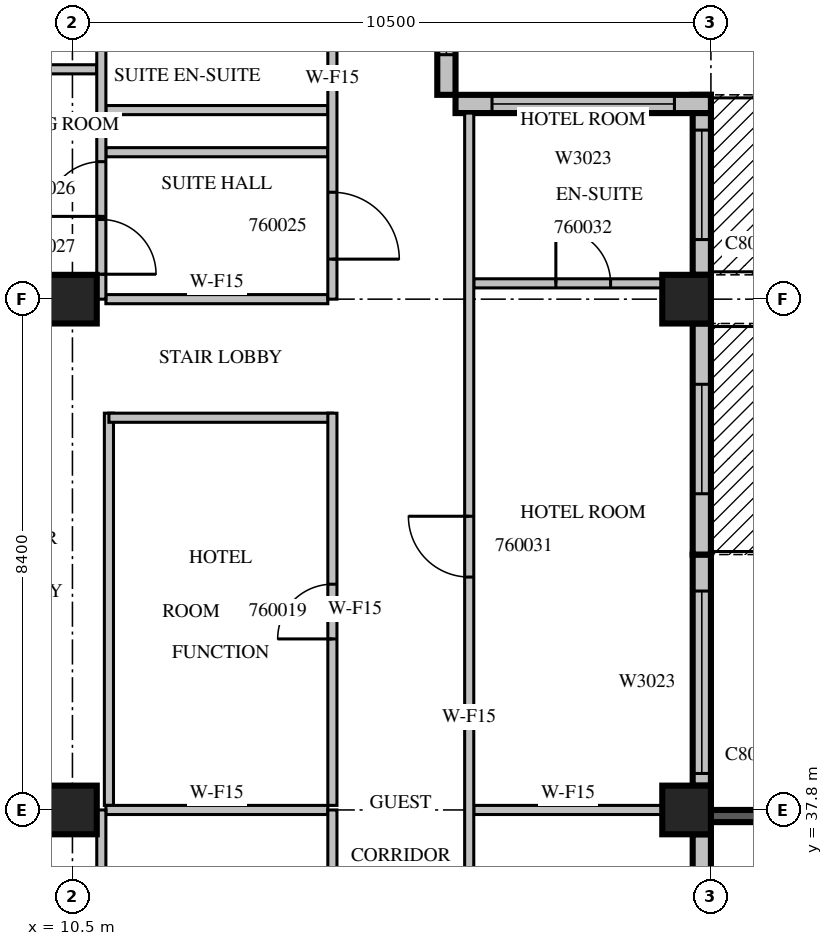
"""IFC4 building model, lengths in metres.
Left out: names, types, materials, properties, quantities, classifications, styles, units other than length and angle.
Written with IfcOpenShell. Run it as: python <this file> out.ifc"""

import sys

from ifc_helpers import new_model, si_unit, direction, frame, frame_2d, origin, origin_2d, place, context, subcontext, project, spatial, rectangle, extrude, source, transform, mapped, element, fill, save


model = new_model("IFC4")
c1 = context("Model", 3, precision=1e-05, world=origin(), true_north=direction((0.0, 1.0)))
c2 = subcontext(c1, "Body", "Model", "MODEL_VIEW")
j1 = project(units=[si_unit("LENGTHUNIT", "METRE"), si_unit("PLANEANGLEUNIT", "RADIAN")], contexts=[c1])
p1 = place(None, origin())
s1 = spatial("IfcSite", under=j1, at=p1, CompositionType="ELEMENT")
p2 = place(p1, origin())
s2 = spatial("IfcBuilding", under=s1, at=p2, CompositionType="ELEMENT")
p3 = place(p2, frame((0.0, 0.0, 261.4)))
s3 = spatial("IfcBuildingStorey", under=s2, at=p3, CompositionType="ELEMENT", Elevation=261.4)
m1 = source(origin(), c2, "Body", "SweptSolid", [
    extrude(rectangle(XDim=0.8, YDim=0.8, at=origin_2d()), origin(), (0.0, 0.0, 1.0), 3.8),
])
for number, where, z_axis, x_axis in (
    (1, (10.5, 37.8, 0.0), (0.0, 0.0, 1.0), (1.0, 0.0, 0.0)),
    (2, (20.6, 37.8, 0.0), (0.0, 0.0, 1.0), (1.0, 0.0, 0.0)),
    (3, (10.5, 46.2, 0.0), (0.0, 0.0, 1.0), (1.0, 0.0, 0.0)),
    (4, (20.6, 46.2, 0.0), (0.0, 0.0, 1.0), (1.0, 0.0, 0.0)),
):
    element("IfcColumn", number, at=place(p3, frame(where, z_axis=z_axis, x_axis=x_axis)), inside=s3, PredefinedType="COLUMN", context=c2, shape_type="MappedRepresentation", body=[
        mapped(m1, transform((0.0, 0.0, 0.0), scale=1.0)),
    ])
m2 = source(origin(), c2, "Body", "SweptSolid", [
    extrude(rectangle(XDim=3.9, YDim=0.2, at=frame_2d((1.95, 0.0))), origin(), (0.0, 0.0, 1.0), 3.4),
])
p4 = place(p3, frame((21.0, 37.7, 0.0), z_axis=(0.0, 0.0, 1.0), x_axis=(1.0, 0.0, 0.0)))
e5 = element("IfcWall", 5, at=p4, inside=s3, PredefinedType="SOLIDWALL", context=c2, shape_type="MappedRepresentation", body=[
    mapped(m2, transform((0.0, 0.0, 0.0), scale=1.0)),
])
m3 = source(origin(), c2, "Body", "SweptSolid", [
    extrude(rectangle(XDim=2.4, YDim=2.3, at=frame_2d((1.2, 1.15))), frame((0.0, 0.11, 0.0), z_axis=(0.0, -1.0, 0.0), x_axis=(1.0, 0.0, 0.0)), (0.0, 0.0, 1.0), 0.22),
])
p5 = place(p4, frame((0.75, 0.0, 0.6)))
e6 = element("IfcOpeningElement", 6, at=p5, cuts=e5, PredefinedType="OPENING", context=c2, shape_type="MappedRepresentation", body=[
    mapped(m3, transform((0.0, 0.0, 0.0), scale=1.0)),
])
m4 = source(origin(), c2, "Body", "SweptSolid", [
    extrude(rectangle(XDim=7.6, YDim=0.3, at=frame_2d((3.8, 0.0))), origin(), (0.0, 0.0, 1.0), 3.4),
])
p6 = place(p3, frame((20.85, 29.8, 0.0), z_axis=(0.0, 0.0, 1.0), x_axis=(0.0, 1.0, 0.0)))
e7 = element("IfcWall", 7, at=p6, inside=s3, PredefinedType="STANDARD", context=c2, shape_type="MappedRepresentation", body=[
    mapped(m4, transform((0.0, 0.0, 0.0), scale=1.0)),
])
m5 = source(origin(), c2, "Body", "SweptSolid", [
    extrude(rectangle(XDim=3.0, YDim=2.3, at=frame_2d((1.5, 1.15))), frame((0.0, 0.16, 0.0), z_axis=(0.0, -1.0, 0.0), x_axis=(1.0, 0.0, 0.0)), (0.0, 0.0, 1.0), 0.32),
])
p7 = place(p6, frame((0.2, 0.0, 0.6)))
e8 = element("IfcOpeningElement", 8, at=p7, cuts=e7, PredefinedType="OPENING", context=c2, shape_type="MappedRepresentation", body=[
    mapped(m5, transform((0.0, 0.0, 0.0), scale=1.0)),
])
m6 = source(origin(), c2, "Body", "SweptSolid", [
    extrude(rectangle(XDim=1.0, YDim=2.1, at=frame_2d((0.5, 1.05))), frame((0.0, 0.16, 0.0), z_axis=(0.0, -1.0, 0.0), x_axis=(1.0, 0.0, 0.0)), (0.0, 0.0, 1.0), 0.32),
])
p8 = place(p6, frame((5.4, 0.0, 0.0)))
e9 = element("IfcOpeningElement", 9, at=p8, cuts=e7, PredefinedType="OPENING", context=c2, shape_type="MappedRepresentation", body=[
    mapped(m6, transform((0.0, 0.0, 0.0), scale=1.0)),
])
m7 = source(origin(), c2, "Body", "SweptSolid", [
    extrude(rectangle(XDim=3.8, YDim=0.3, at=frame_2d((1.9, 0.0))), origin(), (0.0, 0.0, 1.0), 3.4),
])
p9 = place(p3, frame((20.85, 38.2, 0.0), z_axis=(0.0, 0.0, 1.0), x_axis=(0.0, 1.0, 0.0)))
e10 = element("IfcWall", 10, at=p9, inside=s3, PredefinedType="STANDARD", context=c2, shape_type="MappedRepresentation", body=[
    mapped(m7, transform((0.0, 0.0, 0.0), scale=1.0)),
])
p10 = place(p9, frame((0.2, 0.0, 0.6)))
e11 = element("IfcOpeningElement", 11, at=p10, cuts=e10, PredefinedType="OPENING", context=c2, shape_type="MappedRepresentation", body=[
    mapped(m5, transform((0.0, 0.0, 0.0), scale=1.0)),
])
p11 = place(p3, frame((20.85, 42.0, 0.0), z_axis=(0.0, 0.0, 1.0), x_axis=(0.0, 1.0, 0.0)))
e12 = element("IfcWall", 12, at=p11, inside=s3, PredefinedType="STANDARD", context=c2, shape_type="MappedRepresentation", body=[
    mapped(m7, transform((0.0, 0.0, 0.0), scale=1.0)),
])
m8 = source(origin(), c2, "Body", "SweptSolid", [
    extrude(rectangle(XDim=1.8, YDim=2.4, at=frame_2d((0.9, 1.2))), frame((0.0, 0.16, 0.0), z_axis=(0.0, -1.0, 0.0), x_axis=(1.0, 0.0, 0.0)), (0.0, 0.0, 1.0), 0.32),
])
p12 = place(p11, frame((1.0, 0.0, 0.0)))
e13 = element("IfcOpeningElement", 13, at=p12, cuts=e12, PredefinedType="OPENING", context=c2, shape_type="MappedRepresentation", body=[
    mapped(m8, transform((0.0, 0.0, 0.0), scale=1.0)),
])
m9 = source(origin(), c2, "Body", "SweptSolid", [
    extrude(rectangle(XDim=2.96, YDim=0.3, at=frame_2d((1.48, 0.0))), origin(), (0.0, 0.0, 1.0), 3.4),
])
p13 = place(p3, frame((20.85, 46.6, 0.0), z_axis=(0.0, 0.0, 1.0), x_axis=(0.0, 1.0, 0.0)))
e14 = element("IfcWall", 14, at=p13, inside=s3, PredefinedType="STANDARD", context=c2, shape_type="MappedRepresentation", body=[
    mapped(m9, transform((0.0, 0.0, 0.0), scale=1.0)),
])
p14 = place(p13, frame((0.58, 0.0, 0.0)))
e15 = element("IfcOpeningElement", 15, at=p14, cuts=e14, PredefinedType="OPENING", context=c2, shape_type="MappedRepresentation", body=[
    mapped(m8, transform((0.0, 0.0, 0.0), scale=1.0)),
])
m10 = source(origin(), c2, "Body", "SweptSolid", [
    extrude(rectangle(XDim=4.2, YDim=0.3, at=frame_2d((2.1, 0.0))), origin(), (0.0, 0.0, 1.0), 3.4),
])
p15 = place(p3, frame((21.0, 49.41, 0.0), z_axis=(0.0, 0.0, 1.0), x_axis=(-1.0, 0.0, 0.0)))
e16 = element("IfcWall", 16, at=p15, inside=s3, PredefinedType="STANDARD", context=c2, shape_type="MappedRepresentation", body=[
    mapped(m10, transform((0.0, 0.0, 0.0), scale=1.0)),
])
p16 = place(p15, frame((0.6, 0.0, 0.6)))
e17 = element("IfcOpeningElement", 17, at=p16, cuts=e16, PredefinedType="OPENING", context=c2, shape_type="MappedRepresentation", body=[
    mapped(m5, transform((0.0, 0.0, 0.0), scale=1.0)),
])
m11 = source(origin(), c2, "Body", "SweptSolid", [
    extrude(rectangle(XDim=2.52, YDim=0.3, at=frame_2d((1.26, 0.0))), origin(), (0.0, 0.0, 1.0), 3.4),
])
p17 = place(p3, frame((16.65, 49.56, 0.0), z_axis=(0.0, 0.0, 1.0), x_axis=(0.0, 1.0, 0.0)))
e18 = element("IfcWall", 18, at=p17, inside=s3, PredefinedType="STANDARD", context=c2, shape_type="MappedRepresentation", body=[
    mapped(m11, transform((0.0, 0.0, 0.0), scale=1.0)),
])
m12 = source(origin(), c2, "Body", "SweptSolid", [
    extrude(rectangle(XDim=1.2, YDim=2.3, at=frame_2d((0.6, 1.15))), frame((0.0, 0.16, 0.0), z_axis=(0.0, -1.0, 0.0), x_axis=(1.0, 0.0, 0.0)), (0.0, 0.0, 1.0), 0.32),
])
p18 = place(p17, frame((0.66, 0.0, 0.6)))
e19 = element("IfcOpeningElement", 19, at=p18, cuts=e18, PredefinedType="OPENING", context=c2, shape_type="MappedRepresentation", body=[
    mapped(m12, transform((0.0, 0.0, 0.0), scale=1.0)),
])
m13 = source(origin(), c2, "Body", "SweptSolid", [
    extrude(rectangle(XDim=6.45, YDim=0.15, at=frame_2d((3.225, 0.0))), origin(), (0.0, 0.0, 1.0), 3.4),
])
p19 = place(p3, frame((11.1, 44.325, 0.0), z_axis=(0.0, 0.0, 1.0), x_axis=(0.0, -1.0, 0.0)))
e20 = element("IfcWall", 20, at=p19, inside=s3, PredefinedType="PARTITIONING", context=c2, shape_type="MappedRepresentation", body=[
    mapped(m13, transform((0.0, 0.0, 0.0), scale=1.0)),
])
m14 = source(origin(), c2, "Body", "SweptSolid", [
    extrude(rectangle(XDim=3.675, YDim=0.15, at=frame_2d((1.837, 0.0))), origin(), (0.0, 0.0, 1.0), 3.4),
])
p20 = place(p3, frame((14.775, 44.25, 0.0), z_axis=(0.0, 0.0, 1.0), x_axis=(-1.0, 0.0, 0.0)))
e21 = element("IfcWall", 21, at=p20, inside=s3, PredefinedType="PARTITIONING", context=c2, shape_type="MappedRepresentation", body=[
    mapped(m14, transform((0.0, 0.0, 0.0), scale=1.0)),
])
p21 = place(p3, frame((14.775, 37.875, 0.0), z_axis=(0.0, 0.0, 1.0), x_axis=(0.0, 1.0, 0.0)))
e22 = element("IfcWall", 22, at=p21, inside=s3, PredefinedType="PARTITIONING", context=c2, shape_type="MappedRepresentation", body=[
    mapped(m13, transform((0.0, 0.0, 0.0), scale=1.0)),
])
m15 = source(origin(), c2, "Body", "SweptSolid", [
    extrude(rectangle(XDim=0.9, YDim=2.1, at=frame_2d((0.45, 1.05))), frame((0.0, 0.085, 0.0), z_axis=(0.0, -1.0, 0.0), x_axis=(1.0, 0.0, 0.0)), (0.0, 0.0, 1.0), 0.17),
])
p22 = place(p21, frame((2.737, 0.0, 0.0)))
e23 = element("IfcOpeningElement", 23, at=p22, cuts=e22, PredefinedType="OPENING", context=c2, shape_type="MappedRepresentation", body=[
    mapped(m15, transform((0.0, 0.0, 0.0), scale=1.0)),
])
m16 = source(origin(), c2, "Body", "SweptSolid", [
    extrude(rectangle(XDim=3.65, YDim=0.15, at=frame_2d((1.825, 0.0))), origin(), (0.0, 0.0, 1.0), 3.4),
])
p23 = place(p3, frame((14.7, 37.8, 0.0), z_axis=(0.0, 0.0, 1.0), x_axis=(-1.0, 0.0, 0.0)))
e24 = element("IfcWall", 24, at=p23, inside=s3, PredefinedType="PARTITIONING", context=c2, shape_type="MappedRepresentation", body=[
    mapped(m16, transform((0.0, 0.0, 0.0), scale=1.0)),
])
m17 = source(origin(), c2, "Body", "SweptSolid", [
    extrude(rectangle(XDim=8.4, YDim=0.15, at=frame_2d((4.2, 0.0))), origin(), (0.0, 0.0, 1.0), 3.4),
])
p24 = place(p3, frame((10.975, 29.4, 0.0), z_axis=(0.0, 0.0, 1.0), x_axis=(0.0, 1.0, 0.0)))
e25 = element("IfcWall", 25, at=p24, inside=s3, PredefinedType="PARTITIONING", context=c2, shape_type="MappedRepresentation", body=[
    mapped(m17, transform((0.0, 0.0, 0.0), scale=1.0)),
])
m18 = source(origin(), c2, "Body", "SweptSolid", [
    extrude(rectangle(XDim=1.1, YDim=2.1, at=frame_2d((0.55, 1.05))), frame((0.0, 0.085, 0.0), z_axis=(0.0, -1.0, 0.0), x_axis=(1.0, 0.0, 0.0)), (0.0, 0.0, 1.0), 0.17),
])
p25 = place(p24, frame((0.851, 0.0, 0.0)))
e26 = element("IfcOpeningElement", 26, at=p25, cuts=e25, PredefinedType="OPENING", context=c2, shape_type="MappedRepresentation", body=[
    mapped(m18, transform((0.0, 0.0, 0.0), scale=1.0)),
])
p26 = place(p24, frame((3.38, 0.0, 0.0)))
e27 = element("IfcOpeningElement", 27, at=p26, cuts=e25, PredefinedType="OPENING", context=c2, shape_type="MappedRepresentation", body=[
    mapped(m15, transform((0.0, 0.0, 0.0), scale=1.0)),
])
p27 = place(p24, frame((6.179, 0.0, 0.0)))
e28 = element("IfcOpeningElement", 28, at=p27, cuts=e25, PredefinedType="OPENING", context=c2, shape_type="MappedRepresentation", body=[
    mapped(m15, transform((0.0, 0.0, 0.0), scale=1.0)),
])
p28 = place(p3, frame((10.9, 49.98, 0.0), z_axis=(0.0, 0.0, 1.0), x_axis=(-1.0, 0.0, 0.0)))
e29 = element("IfcWall", 29, at=p28, inside=s3, PredefinedType="PARTITIONING", context=c2, shape_type="SweptSolid", body=[
    extrude(rectangle(XDim=4.395, YDim=0.15, at=frame_2d((2.197, 0.0))), origin(), (0.0, 0.0, 1.0), 3.4),
])
m19 = source(origin(), c2, "Body", "SweptSolid", [
    extrude(rectangle(XDim=1.0, YDim=2.1, at=frame_2d((0.5, 1.05))), frame((0.0, 0.085, 0.0), z_axis=(0.0, -1.0, 0.0), x_axis=(1.0, 0.0, 0.0)), (0.0, 0.0, 1.0), 0.17),
])
p29 = place(p28, frame((3.3, 0.0, 0.0)))
e30 = element("IfcOpeningElement", 30, at=p29, cuts=e29, PredefinedType="OPENING", context=c2, shape_type="MappedRepresentation", body=[
    mapped(m19, transform((0.0, 0.0, 0.0), scale=1.0)),
])
for number, where, z_axis, x_axis in (
    (31, (14.7, 48.617, 0.0), (0.0, 0.0, 1.0), (-1.0, 0.0, 0.0)),
    (32, (14.7, 49.309, 0.0), (0.0, 0.0, 1.0), (-1.0, 0.0, 0.0)),
    (33, (14.7, 46.2, 0.0), (0.0, 0.0, 1.0), (-1.0, 0.0, 0.0)),
):
    element("IfcWall", number, at=place(p3, frame(where, z_axis=z_axis, x_axis=x_axis)), inside=s3, PredefinedType="PARTITIONING", context=c2, shape_type="MappedRepresentation", body=[
        mapped(m16, transform((0.0, 0.0, 0.0), scale=1.0)),
    ])
m20 = source(origin(), c2, "Body", "SweptSolid", [
    extrude(rectangle(XDim=7.26, YDim=0.15, at=frame_2d((3.63, 0.0))), origin(), (0.0, 0.0, 1.0), 3.4),
])
p30 = place(p3, frame((10.975, 46.2, 0.0), z_axis=(0.0, 0.0, 1.0), x_axis=(0.0, 1.0, 0.0)))
e34 = element("IfcWall", 34, at=p30, inside=s3, PredefinedType="PARTITIONING", context=c2, shape_type="MappedRepresentation", body=[
    mapped(m20, transform((0.0, 0.0, 0.0), scale=1.0)),
])
p31 = place(p30, frame((1.361, 0.0, 0.0)))
e35 = element("IfcOpeningElement", 35, at=p31, cuts=e34, PredefinedType="OPENING", context=c2, shape_type="MappedRepresentation", body=[
    mapped(m15, transform((0.0, 0.0, 0.0), scale=1.0)),
])
p32 = place(p30, frame((0.41, 0.0, 0.0)))
e36 = element("IfcOpeningElement", 36, at=p32, cuts=e34, PredefinedType="OPENING", context=c2, shape_type="MappedRepresentation", body=[
    mapped(m15, transform((0.0, 0.0, 0.0), scale=1.0)),
])
p33 = place(p30, frame((4.096, 0.0, 0.0)))
e37 = element("IfcOpeningElement", 37, at=p33, cuts=e34, PredefinedType="OPENING", context=c2, shape_type="MappedRepresentation", body=[
    mapped(m15, transform((0.0, 0.0, 0.0), scale=1.0)),
])
m21 = source(origin(), c2, "Body", "SweptSolid", [
    extrude(rectangle(XDim=3.101, YDim=0.15, at=frame_2d((1.55, 0.0))), origin(), (0.0, 0.0, 1.0), 3.4),
])
p34 = place(p3, frame((17.1, 46.46, 0.0), z_axis=(0.0, 0.0, 1.0), x_axis=(1.0, 0.0, 0.0)))
e38 = element("IfcWall", 38, at=p34, inside=s3, PredefinedType="PARTITIONING", context=c2, shape_type="MappedRepresentation", body=[
    mapped(m21, transform((0.0, 0.0, 0.0), scale=1.0)),
])
p35 = place(p34, frame((1.35, 0.0, 0.0)))
e39 = element("IfcOpeningElement", 39, at=p35, cuts=e38, PredefinedType="OPENING", context=c2, shape_type="MappedRepresentation", body=[
    mapped(m15, transform((0.0, 0.0, 0.0), scale=1.0)),
])
p36 = place(p3, frame((20.201, 37.8, 0.0), z_axis=(0.0, 0.0, 1.0), x_axis=(-1.0, 0.0, 0.0)))
e40 = element("IfcWall", 40, at=p36, inside=s3, PredefinedType="PARTITIONING", context=c2, shape_type="MappedRepresentation", body=[
    mapped(m21, transform((0.0, 0.0, 0.0), scale=1.0)),
])
p37 = place(p3, frame((14.775, 29.4, 0.0), z_axis=(0.0, 0.0, 1.0), x_axis=(0.0, 1.0, 0.0)))
e41 = element("IfcWall", 41, at=p37, inside=s3, PredefinedType="PARTITIONING", context=c2, shape_type="MappedRepresentation", body=[
    mapped(m17, transform((0.0, 0.0, 0.0), scale=1.0)),
])
p38 = place(p37, frame((0.638, 0.0, 0.0)))
e42 = element("IfcOpeningElement", 42, at=p38, cuts=e41, PredefinedType="OPENING", context=c2, shape_type="MappedRepresentation", body=[
    mapped(m18, transform((0.0, 0.0, 0.0), scale=1.0)),
])
p39 = place(p3, frame((14.775, 46.2, 0.0), z_axis=(0.0, 0.0, 1.0), x_axis=(0.0, 1.0, 0.0)))
e43 = element("IfcWall", 43, at=p39, inside=s3, PredefinedType="PARTITIONING", context=c2, shape_type="MappedRepresentation", body=[
    mapped(m20, transform((0.0, 0.0, 0.0), scale=1.0)),
])
p40 = place(p39, frame((0.658, 0.0, 0.0)))
e44 = element("IfcOpeningElement", 44, at=p40, cuts=e43, PredefinedType="OPENING", context=c2, shape_type="MappedRepresentation", body=[
    mapped(m18, transform((0.0, 0.0, 0.0), scale=1.0)),
])
m22 = source(origin(), c2, "Body", "SweptSolid", [
    extrude(rectangle(XDim=19.86, YDim=0.15, at=frame_2d((9.93, 0.0))), origin(), (0.0, 0.0, 1.0), 3.4),
])
p41 = place(p3, frame((17.025, 49.26, 0.0), z_axis=(0.0, 0.0, 1.0), x_axis=(0.0, -1.0, 0.0)))
e45 = element("IfcWall", 45, at=p41, inside=s3, PredefinedType="PARTITIONING", context=c2, shape_type="MappedRepresentation", body=[
    mapped(m22, transform((0.0, 0.0, 0.0), scale=1.0)),
])
m23 = source(origin(), c2, "Body", "SweptSolid", [
    extrude(rectangle(XDim=1.2, YDim=2.1, at=frame_2d((0.6, 1.05))), frame((0.0, 0.085, 0.0), z_axis=(0.0, -1.0, 0.0), x_axis=(1.0, 0.0, 0.0)), (0.0, 0.0, 1.0), 0.17),
])
p42 = place(p41, frame((15.06, 0.0, 0.0)))
e46 = element("IfcOpeningElement", 46, at=p42, cuts=e45, PredefinedType="OPENING", context=c2, shape_type="MappedRepresentation", body=[
    mapped(m23, transform((0.0, 0.0, 0.0), scale=1.0)),
])
p43 = place(p41, frame((6.63, 0.0, 0.0)))
e47 = element("IfcOpeningElement", 47, at=p43, cuts=e45, PredefinedType="OPENING", context=c2, shape_type="MappedRepresentation", body=[
    mapped(m19, transform((0.0, 0.0, 0.0), scale=1.0)),
])
m24 = source(origin(), c2, "Body", "SweptSolid", [
    extrude(rectangle(XDim=3.0, YDim=2.3, at=frame_2d((1.5, 1.15))), frame((0.0, 0.03, 0.0), z_axis=(0.0, -1.0, 0.0), x_axis=(1.0, 0.0, 0.0)), (0.0, 0.0, 1.0), 0.06),
])
p44 = place(p10, origin())
e48 = element("IfcWindow", 48, at=p44, inside=s3, PartitioningType="SINGLE_PANEL", PredefinedType="WINDOW", context=c2, shape_type="MappedRepresentation", body=[
    mapped(m24, transform((0.0, 0.0, 0.0), scale=1.0)),
])
fill(e11, e48)
m25 = source(origin(), c2, "Body", "SweptSolid", [
    extrude(rectangle(XDim=1.8, YDim=2.4, at=frame_2d((0.9, 1.2))), frame((0.0, 0.025, 0.0), z_axis=(0.0, -1.0, 0.0), x_axis=(1.0, 0.0, 0.0)), (0.0, 0.0, 1.0), 0.05),
])
p45 = place(p12, origin())
e49 = element("IfcDoor", 49, at=p45, inside=s3, OperationType="SLIDING_TO_LEFT", PredefinedType="DOOR", context=c2, shape_type="MappedRepresentation", body=[
    mapped(m25, transform((0.0, 0.0, 0.0), scale=1.0)),
])
fill(e13, e49)
p46 = place(p14, origin())
e50 = element("IfcDoor", 50, at=p46, inside=s3, OperationType="SLIDING_TO_LEFT", PredefinedType="DOOR", context=c2, shape_type="MappedRepresentation", body=[
    mapped(m25, transform((0.0, 0.0, 0.0), scale=1.0)),
])
fill(e15, e50)
p47 = place(p16, origin())
e51 = element("IfcWindow", 51, at=p47, inside=s3, PartitioningType="SINGLE_PANEL", PredefinedType="WINDOW", context=c2, shape_type="MappedRepresentation", body=[
    mapped(m24, transform((0.0, 0.0, 0.0), scale=1.0)),
])
fill(e17, e51)
m26 = source(origin(), c2, "Body", "SweptSolid", [
    extrude(rectangle(XDim=1.2, YDim=2.3, at=frame_2d((0.6, 1.15))), frame((0.0, 0.03, 0.0), z_axis=(0.0, -1.0, 0.0), x_axis=(1.0, 0.0, 0.0)), (0.0, 0.0, 1.0), 0.06),
])
p48 = place(p18, origin())
e52 = element("IfcWindow", 52, at=p48, inside=s3, PartitioningType="SINGLE_PANEL", PredefinedType="WINDOW", context=c2, shape_type="MappedRepresentation", body=[
    mapped(m26, transform((0.0, 0.0, 0.0), scale=1.0)),
])
fill(e19, e52)
m27 = source(origin(), c2, "Body", "SweptSolid", [
    extrude(rectangle(XDim=0.9, YDim=2.1, at=frame_2d((0.45, 1.05))), frame((0.0, 0.025, 0.0), z_axis=(0.0, -1.0, 0.0), x_axis=(1.0, 0.0, 0.0)), (0.0, 0.0, 1.0), 0.05),
])
p49 = place(p22, origin())
e53 = element("IfcDoor", 53, at=p49, inside=s3, OperationType="SINGLE_SWING_LEFT", PredefinedType="DOOR", context=c2, shape_type="MappedRepresentation", body=[
    mapped(m27, transform((0.0, 0.0, 0.0), scale=1.0)),
])
fill(e23, e53)
m28 = source(origin(), c2, "Body", "SweptSolid", [
    extrude(rectangle(XDim=1.1, YDim=2.1, at=frame_2d((0.55, 1.05))), frame((0.0, 0.025, 0.0), z_axis=(0.0, -1.0, 0.0), x_axis=(1.0, 0.0, 0.0)), (0.0, 0.0, 1.0), 0.05),
])
p50 = place(p40, origin())
e54 = element("IfcDoor", 54, at=p50, inside=s3, OperationType="SINGLE_SWING_RIGHT", PredefinedType="DOOR", context=c2, shape_type="MappedRepresentation", body=[
    mapped(m28, transform((0.0, 0.0, 0.0), scale=1.0)),
])
fill(e44, e54)
p51 = place(p31, origin())
e55 = element("IfcDoor", 55, at=p51, inside=s3, OperationType="SINGLE_SWING_LEFT", PredefinedType="DOOR", context=c2, shape_type="MappedRepresentation", body=[
    mapped(m27, transform((0.0, 0.0, 0.0), scale=1.0)),
])
fill(e35, e55)
p52 = place(p32, origin())
e56 = element("IfcDoor", 56, at=p52, inside=s3, OperationType="SINGLE_SWING_RIGHT", PredefinedType="DOOR", context=c2, shape_type="MappedRepresentation", body=[
    mapped(m27, transform((0.0, 0.0, 0.0), scale=1.0)),
])
fill(e36, e56)
m29 = source(origin(), c2, "Body", "SweptSolid", [
    extrude(rectangle(XDim=1.0, YDim=2.1, at=frame_2d((0.5, 1.05))), frame((0.0, 0.025, 0.0), z_axis=(0.0, -1.0, 0.0), x_axis=(1.0, 0.0, 0.0)), (0.0, 0.0, 1.0), 0.05),
])
p53 = place(p43, origin())
e57 = element("IfcDoor", 57, at=p53, inside=s3, OperationType="SINGLE_SWING_RIGHT", PredefinedType="DOOR", context=c2, shape_type="MappedRepresentation", body=[
    mapped(m29, transform((0.0, 0.0, 0.0), scale=1.0)),
])
fill(e47, e57)
p54 = place(p35, origin())
e58 = element("IfcDoor", 58, at=p54, inside=s3, OperationType="SINGLE_SWING_LEFT", PredefinedType="DOOR", context=c2, shape_type="MappedRepresentation", body=[
    mapped(m27, transform((0.0, 0.0, 0.0), scale=1.0)),
])
fill(e39, e58)
save(model, sys.argv[1])
